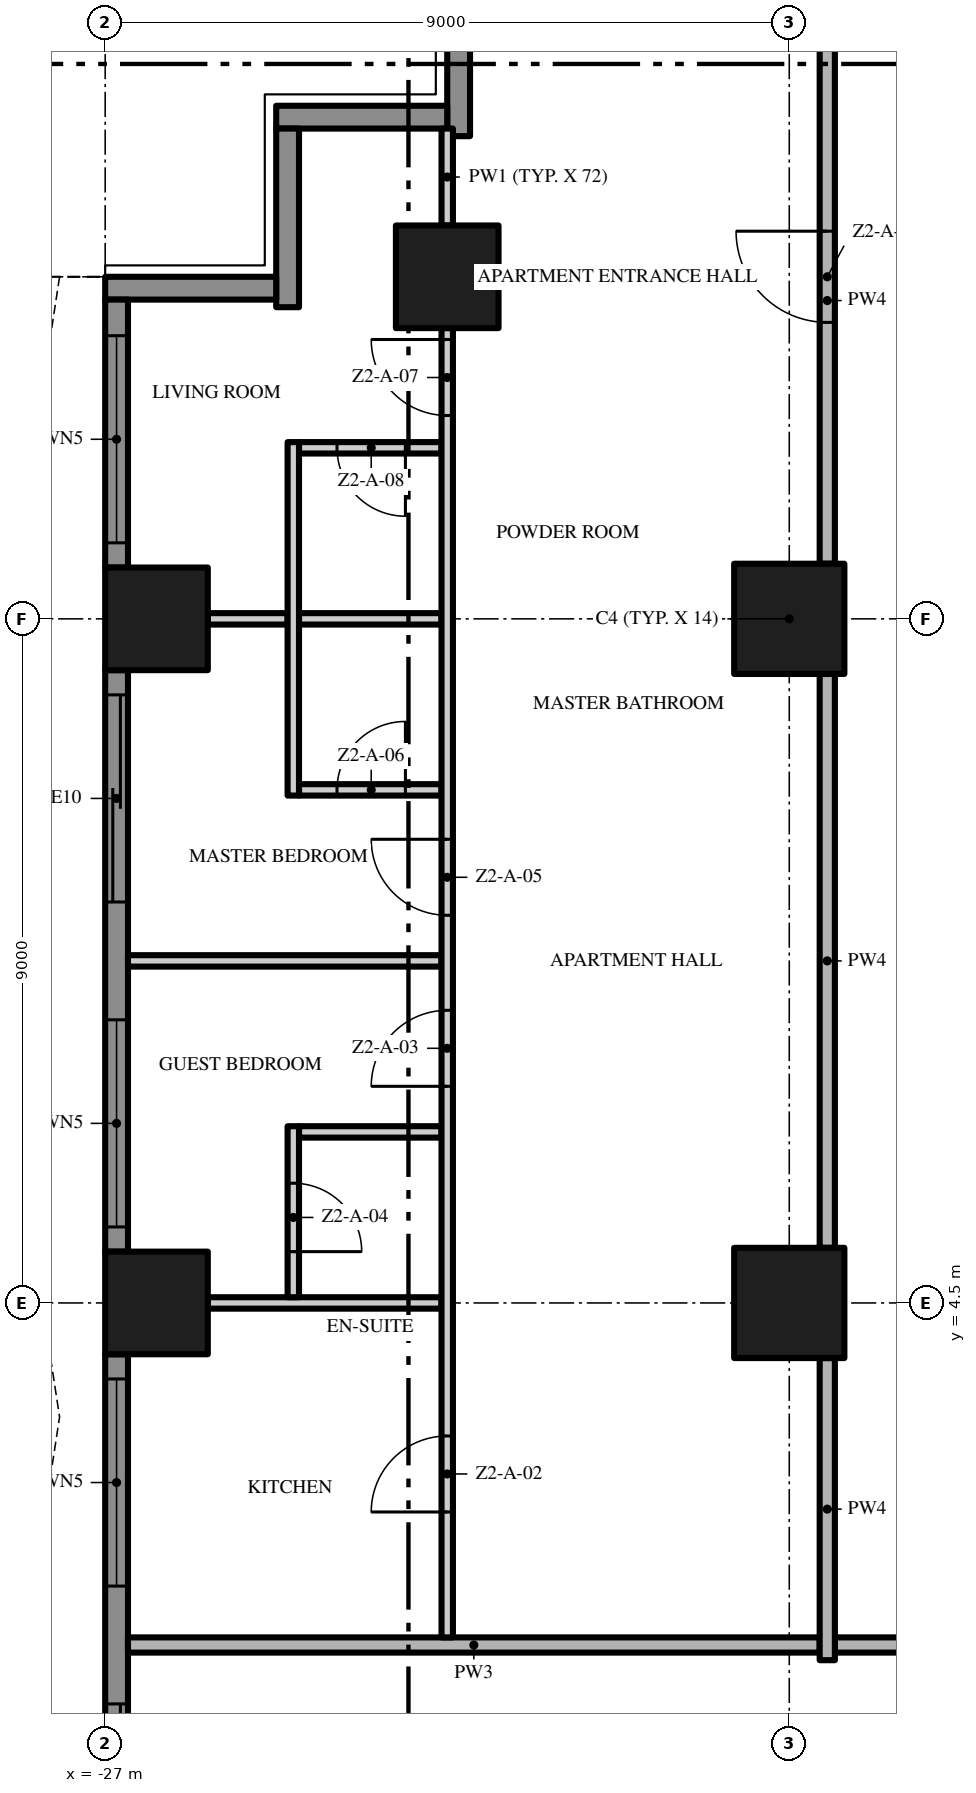
"""IFC4 building model, lengths in metres.
Left out: names, types, materials, properties, quantities, classifications, styles, units other than length and angle.
Written with IfcOpenShell. Run it as: python <this file> out.ifc"""

import sys

from ifc_helpers import new_model, si_unit, direction, frame, frame_2d, origin, origin_2d, place, context, subcontext, project, spatial, polyline, rectangle, outline, extrude, element, fill, save


model = new_model("IFC4")
c1 = context("Model", 3, precision=1e-05, world=origin(), true_north=direction((0.0, 1.0)))
c2 = subcontext(c1, "Body", "Model", "MODEL_VIEW")
j1 = project(units=[si_unit("LENGTHUNIT", "METRE"), si_unit("PLANEANGLEUNIT", "RADIAN")], contexts=[c1])
p1 = place(None, origin())
s1 = spatial("IfcSite", under=j1, at=p1, CompositionType="ELEMENT")
p2 = place(p1, origin())
s2 = spatial("IfcBuilding", under=s1, at=p2, CompositionType="ELEMENT")
p3 = place(p2, frame((0.0, 0.0, 69.4)))
s3 = spatial("IfcBuildingStorey", under=s2, at=p3, CompositionType="ELEMENT", Elevation=69.4)
for number, where, z_axis, x_axis in (
    (1, (-18.0, 13.5, 0.0), (0.0, 0.0, 1.0), (1.0, 0.0, 0.0)),
    (2, (-18.0, 4.5, 0.0), (0.0, 0.0, 1.0), (1.0, 0.0, 0.0)),
):
    element("IfcColumn", number, at=place(p3, frame(where, z_axis=z_axis, x_axis=x_axis)), inside=s3, PredefinedType="COLUMN", context=c2, shape_type="SweptSolid", body=[
        extrude(rectangle(XDim=1.45, YDim=1.45, at=origin_2d()), origin(), (0.0, 0.0, 1.0), 3.5),
    ])
for number, where, z_axis, x_axis in (
    (3, (-26.325, 13.5, 0.0), (0.0, 0.0, 1.0), (1.0, 0.0, 0.0)),
    (4, (-22.5, 18.0, 0.0), (0.0, 0.0, 1.0), (1.0, 0.0, 0.0)),
    (5, (-26.325, 4.5, 0.0), (0.0, 0.0, 1.0), (1.0, 0.0, 0.0)),
):
    element("IfcColumn", number, at=place(p3, frame(where, z_axis=z_axis, x_axis=x_axis)), inside=s3, PredefinedType="COLUMN", context=c2, shape_type="SweptSolid", body=[
        extrude(rectangle(XDim=1.35, YDim=1.35, at=origin_2d()), origin(), (0.0, 0.0, 1.0), 3.5),
    ])
p4 = place(p3, frame((-22.35, 19.85, 0.0), z_axis=(0.0, 0.0, 1.0), x_axis=(0.0, 1.0, 0.0)))
e6 = element("IfcWall", 6, at=p4, inside=s3, PredefinedType="SOLIDWALL", context=c2, shape_type="SweptSolid", body=[
    extrude(rectangle(XDim=2.35, YDim=0.3, at=frame_2d((1.175, 0.0))), origin(), (0.0, 0.0, 1.0), 3.5),
])
p5 = place(p3, frame((-24.75, 20.1, 0.0), z_axis=(0.0, 0.0, 1.0), x_axis=(1.0, 0.0, 0.0)))
e7 = element("IfcWall", 7, at=p5, inside=s3, PredefinedType="SOLIDWALL", context=c2, shape_type="SweptSolid", body=[
    extrude(rectangle(XDim=2.25, YDim=0.3, at=frame_2d((1.125, 0.0))), origin(), (0.0, 0.0, 1.0), 3.5),
])
p6 = place(p3, frame((-24.6, 17.6, 0.0), z_axis=(0.0, 0.0, 1.0), x_axis=(0.0, 1.0, 0.0)))
e8 = element("IfcWall", 8, at=p6, inside=s3, PredefinedType="SOLIDWALL", context=c2, shape_type="SweptSolid", body=[
    extrude(rectangle(XDim=2.35, YDim=0.3, at=frame_2d((1.175, 0.0))), origin(), (0.0, 0.0, 1.0), 3.5),
])
p7 = place(p3, frame((-27.0, 17.85, 0.0), z_axis=(0.0, 0.0, 1.0), x_axis=(1.0, 0.0, 0.0)))
e9 = element("IfcWall", 9, at=p7, inside=s3, PredefinedType="SOLIDWALL", context=c2, shape_type="SweptSolid", body=[
    extrude(rectangle(XDim=2.25, YDim=0.3, at=frame_2d((1.125, 0.0))), origin(), (0.0, 0.0, 1.0), 3.5),
])
p8 = place(p3, frame((-26.85, 14.175, 0.0), z_axis=(0.0, 0.0, 1.0), x_axis=(0.0, 1.0, 0.0)))
e10 = element("IfcWall", 10, at=p8, inside=s3, PredefinedType="SOLIDWALL", context=c2, shape_type="SweptSolid", body=[
    extrude(rectangle(XDim=3.525, YDim=0.3, at=frame_2d((1.762, 0.0))), origin(), (0.0, 0.0, 1.0), 3.5),
])
p9 = place(p8, frame((0.325, 0.0, 0.45)))
e11 = element("IfcOpeningElement", 11, at=p9, cuts=e10, PredefinedType="OPENING", context=c2, shape_type="SweptSolid", body=[
    extrude(rectangle(XDim=2.725, YDim=2.65, at=frame_2d((1.363, 1.325))), frame((0.0, 0.16, 0.0), z_axis=(0.0, -1.0, 0.0), x_axis=(1.0, 0.0, 0.0)), (0.0, 0.0, 1.0), 0.32),
])
p10 = place(p3, frame((-26.85, 5.175, 0.0), z_axis=(0.0, 0.0, 1.0), x_axis=(0.0, 1.0, 0.0)))
e12 = element("IfcWall", 12, at=p10, inside=s3, PredefinedType="SOLIDWALL", context=c2, shape_type="SweptSolid", body=[
    extrude(rectangle(XDim=7.65, YDim=0.3, at=frame_2d((3.825, 0.0))), origin(), (0.0, 0.0, 1.0), 3.5),
])
p11 = place(p10, frame((4.6, 0.0, 0.0)))
e13 = element("IfcOpeningElement", 13, at=p11, cuts=e12, PredefinedType="OPENING", context=c2, shape_type="SweptSolid", body=[
    extrude(rectangle(XDim=2.725, YDim=2.4, at=frame_2d((1.363, 1.2))), frame((0.0, 0.16, 0.0), z_axis=(0.0, -1.0, 0.0), x_axis=(1.0, 0.0, 0.0)), (0.0, 0.0, 1.0), 0.32),
])
p12 = place(p10, frame((0.325, 0.0, 0.45)))
e14 = element("IfcOpeningElement", 14, at=p12, cuts=e12, PredefinedType="OPENING", context=c2, shape_type="SweptSolid", body=[
    extrude(rectangle(XDim=2.725, YDim=2.65, at=frame_2d((1.363, 1.325))), frame((0.0, 0.16, 0.0), z_axis=(0.0, -1.0, 0.0), x_axis=(1.0, 0.0, 0.0)), (0.0, 0.0, 1.0), 0.32),
])
p13 = place(p3, frame((-26.85, -3.825, 0.0), z_axis=(0.0, 0.0, 1.0), x_axis=(0.0, 1.0, 0.0)))
e15 = element("IfcWall", 15, at=p13, inside=s3, PredefinedType="SOLIDWALL", context=c2, shape_type="SweptSolid", body=[
    extrude(rectangle(XDim=7.65, YDim=0.3, at=frame_2d((3.825, 0.0))), origin(), (0.0, 0.0, 1.0), 3.5),
])
p14 = place(p13, frame((4.6, 0.0, 0.45)))
e16 = element("IfcOpeningElement", 16, at=p14, cuts=e15, PredefinedType="OPENING", context=c2, shape_type="SweptSolid", body=[
    extrude(rectangle(XDim=2.725, YDim=2.65, at=frame_2d((1.363, 1.325))), frame((0.0, 0.16, 0.0), z_axis=(0.0, -1.0, 0.0), x_axis=(1.0, 0.0, 0.0)), (0.0, 0.0, 1.0), 0.32),
])
p15 = place(p13, frame((0.325, 0.0, 0.0)))
e17 = element("IfcOpeningElement", 17, at=p15, cuts=e15, PredefinedType="OPENING", context=c2, shape_type="SweptSolid", body=[
    extrude(rectangle(XDim=2.725, YDim=2.4, at=frame_2d((1.363, 1.2))), frame((0.0, 0.16, 0.0), z_axis=(0.0, -1.0, 0.0), x_axis=(1.0, 0.0, 0.0)), (0.0, 0.0, 1.0), 0.32),
])
p16 = place(p3, origin())
e18 = element("IfcWall", 18, at=p16, inside=s3, PredefinedType="USERDEFINED", context=c2, shape_type="SweptSolid", body=[
    extrude(outline(polyline([(-27.6, 18.0), (-27.829, 16.5), (-28.429, 15.0), (-29.171, 13.5), (-29.771, 12.0), (-30.0, 10.5), (-29.771, 9.0), (-29.171, 7.5), (-28.429, 6.0), (-27.829, 4.5), (-27.6, 3.0), (-27.829, 1.5), (-28.429, 0.0), (-29.171, -1.5), (-29.771, -3.0), (-30.0, -4.5), (-29.771, -6.0), (-29.171, -7.5), (-28.429, -9.0), (-27.829, -10.5), (-27.6, -12.0), (-27.829, -13.5), (-28.429, -15.0), (-29.171, -16.5), (-29.771, -18.0), (-29.539, -18.093), (-28.942, -16.602), (-28.201, -15.102), (-27.586, -13.566), (-27.347, -12.0), (-27.586, -10.434), (-28.201, -8.898), (-28.942, -7.398), (-29.528, -5.934), (-29.747, -4.5), (-29.528, -3.066), (-28.942, -1.602), (-28.201, -0.102), (-27.586, 1.434), (-27.347, 3.0), (-27.586, 4.566), (-28.201, 6.102), (-28.942, 7.602), (-29.528, 9.066), (-29.747, 10.5), (-29.528, 11.934), (-28.942, 13.398), (-28.201, 14.898), (-27.586, 16.434), (-27.353, 17.962), (-27.6, 18.0)])), origin(), (0.0, 0.0, 1.0), 0.9),
])
p17 = place(p3, frame((-0.1, 0.0, 0.0), z_axis=(0.0, 0.0, 1.0), x_axis=(-1.0, 0.0, 0.0)))
e19 = element("IfcWall", 19, at=p17, inside=s3, PredefinedType="PARTITIONING", context=c2, shape_type="SweptSolid", body=[
    extrude(rectangle(XDim=17.3, YDim=0.2, at=frame_2d((8.65, 0.0))), origin(), (0.0, 0.0, 1.0), 3.5),
])
p18 = place(p17, frame((8.15, 0.0, 0.0)))
e20 = element("IfcOpeningElement", 20, at=p18, cuts=e19, PredefinedType="OPENING", context=c2, shape_type="SweptSolid", body=[
    extrude(rectangle(XDim=1.5, YDim=2.4, at=frame_2d((0.75, 1.2))), frame((0.0, 0.11, 0.0), z_axis=(0.0, -1.0, 0.0), x_axis=(1.0, 0.0, 0.0)), (0.0, 0.0, 1.0), 0.22),
])
p19 = place(p3, frame((-26.7, 0.0, 0.0), z_axis=(0.0, 0.0, 1.0), x_axis=(1.0, 0.0, 0.0)))
e21 = element("IfcWall", 21, at=p19, inside=s3, PredefinedType="PARTITIONING", context=c2, shape_type="SweptSolid", body=[
    extrude(rectangle(XDim=9.1, YDim=0.2, at=frame_2d((4.55, 0.0))), origin(), (0.0, 0.0, 1.0), 3.5),
])
p20 = place(p3, frame((-25.65, 4.5, 0.0), z_axis=(0.0, 0.0, 1.0), x_axis=(1.0, 0.0, 0.0)))
e22 = element("IfcWall", 22, at=p20, inside=s3, PredefinedType="PARTITIONING", context=c2, shape_type="SweptSolid", body=[
    extrude(rectangle(XDim=3.075, YDim=0.15, at=frame_2d((1.538, 0.0))), origin(), (0.0, 0.0, 1.0), 3.5),
])
p21 = place(p3, frame((-24.45, 6.75, 0.0), z_axis=(0.0, 0.0, 1.0), x_axis=(1.0, 0.0, 0.0)))
e23 = element("IfcWall", 23, at=p21, inside=s3, PredefinedType="PARTITIONING", context=c2, shape_type="SweptSolid", body=[
    extrude(rectangle(XDim=1.875, YDim=0.15, at=frame_2d((0.938, 0.0))), origin(), (0.0, 0.0, 1.0), 3.5),
])
p22 = place(p3, frame((-26.7, 9.0, 0.0), z_axis=(0.0, 0.0, 1.0), x_axis=(1.0, 0.0, 0.0)))
e24 = element("IfcWall", 24, at=p22, inside=s3, PredefinedType="PARTITIONING", context=c2, shape_type="SweptSolid", body=[
    extrude(rectangle(XDim=4.125, YDim=0.15, at=frame_2d((2.062, 0.0))), origin(), (0.0, 0.0, 1.0), 3.5),
])
p23 = place(p3, frame((-24.45, 11.25, 0.0), z_axis=(0.0, 0.0, 1.0), x_axis=(1.0, 0.0, 0.0)))
e25 = element("IfcWall", 25, at=p23, inside=s3, PredefinedType="PARTITIONING", context=c2, shape_type="SweptSolid", body=[
    extrude(rectangle(XDim=1.875, YDim=0.15, at=frame_2d((0.938, 0.0))), origin(), (0.0, 0.0, 1.0), 3.5),
])
p24 = place(p23, frame((0.5, 0.0, 0.0)))
e26 = element("IfcOpeningElement", 26, at=p24, cuts=e25, PredefinedType="OPENING", context=c2, shape_type="SweptSolid", body=[
    extrude(rectangle(XDim=0.9, YDim=2.1, at=frame_2d((0.45, 1.05))), frame((0.0, 0.085, 0.0), z_axis=(0.0, -1.0, 0.0), x_axis=(1.0, 0.0, 0.0)), (0.0, 0.0, 1.0), 0.17),
])
p25 = place(p3, frame((-25.65, 13.5, 0.0), z_axis=(0.0, 0.0, 1.0), x_axis=(1.0, 0.0, 0.0)))
e27 = element("IfcWall", 27, at=p25, inside=s3, PredefinedType="PARTITIONING", context=c2, shape_type="SweptSolid", body=[
    extrude(rectangle(XDim=1.05, YDim=0.15, at=frame_2d((0.525, 0.0))), origin(), (0.0, 0.0, 1.0), 3.5),
])
p26 = place(p3, frame((-24.45, 13.5, 0.0), z_axis=(0.0, 0.0, 1.0), x_axis=(1.0, 0.0, 0.0)))
e28 = element("IfcWall", 28, at=p26, inside=s3, PredefinedType="PARTITIONING", context=c2, shape_type="SweptSolid", body=[
    extrude(rectangle(XDim=1.875, YDim=0.15, at=frame_2d((0.938, 0.0))), origin(), (0.0, 0.0, 1.0), 3.5),
])
p27 = place(p3, frame((-22.575, 15.75, 0.0), z_axis=(0.0, 0.0, 1.0), x_axis=(-1.0, 0.0, 0.0)))
e29 = element("IfcWall", 29, at=p27, inside=s3, PredefinedType="PARTITIONING", context=c2, shape_type="SweptSolid", body=[
    extrude(rectangle(XDim=1.875, YDim=0.15, at=frame_2d((0.938, 0.0))), origin(), (0.0, 0.0, 1.0), 3.5),
])
p28 = place(p27, frame((0.475, 0.0, 0.0)))
e30 = element("IfcOpeningElement", 30, at=p28, cuts=e29, PredefinedType="OPENING", context=c2, shape_type="SweptSolid", body=[
    extrude(rectangle(XDim=0.9, YDim=2.1, at=frame_2d((0.45, 1.05))), frame((0.0, 0.085, 0.0), z_axis=(0.0, -1.0, 0.0), x_axis=(1.0, 0.0, 0.0)), (0.0, 0.0, 1.0), 0.17),
])
p29 = place(p3, frame((-24.525, 6.825, 0.0), z_axis=(0.0, 0.0, 1.0), x_axis=(0.0, -1.0, 0.0)))
e31 = element("IfcWall", 31, at=p29, inside=s3, PredefinedType="PARTITIONING", context=c2, shape_type="SweptSolid", body=[
    extrude(rectangle(XDim=2.25, YDim=0.15, at=frame_2d((1.125, 0.0))), origin(), (0.0, 0.0, 1.0), 3.5),
])
p30 = place(p29, frame((0.75, 0.0, 0.0)))
e32 = element("IfcOpeningElement", 32, at=p30, cuts=e31, PredefinedType="OPENING", context=c2, shape_type="SweptSolid", body=[
    extrude(rectangle(XDim=0.9, YDim=2.1, at=frame_2d((0.45, 1.05))), frame((0.0, 0.085, 0.0), z_axis=(0.0, -1.0, 0.0), x_axis=(1.0, 0.0, 0.0)), (0.0, 0.0, 1.0), 0.17),
])
p31 = place(p3, frame((-24.525, 11.175, 0.0), z_axis=(0.0, 0.0, 1.0), x_axis=(0.0, 1.0, 0.0)))
e33 = element("IfcWall", 33, at=p31, inside=s3, PredefinedType="PARTITIONING", context=c2, shape_type="SweptSolid", body=[
    extrude(rectangle(XDim=4.65, YDim=0.15, at=frame_2d((2.325, 0.0))), origin(), (0.0, 0.0, 1.0), 3.5),
])
p32 = place(p3, frame((-22.5, 0.1, 0.0), z_axis=(0.0, 0.0, 1.0), x_axis=(0.0, 1.0, 0.0)))
e34 = element("IfcWall", 34, at=p32, inside=s3, PredefinedType="PARTITIONING", context=c2, shape_type="SweptSolid", body=[
    extrude(rectangle(XDim=17.225, YDim=0.15, at=frame_2d((8.613, 0.0))), origin(), (0.0, 0.0, 1.0), 3.5),
])
p33 = place(p32, frame((1.65, 0.0, 0.0)))
e35 = element("IfcOpeningElement", 35, at=p33, cuts=e34, PredefinedType="OPENING", context=c2, shape_type="SweptSolid", body=[
    extrude(rectangle(XDim=1.0, YDim=2.4, at=frame_2d((0.5, 1.2))), frame((0.0, 0.085, 0.0), z_axis=(0.0, -1.0, 0.0), x_axis=(1.0, 0.0, 0.0)), (0.0, 0.0, 1.0), 0.17),
])
p34 = place(p32, frame((7.25, 0.0, 0.0)))
e36 = element("IfcOpeningElement", 36, at=p34, cuts=e34, PredefinedType="OPENING", context=c2, shape_type="SweptSolid", body=[
    extrude(rectangle(XDim=1.0, YDim=2.4, at=frame_2d((0.5, 1.2))), frame((0.0, 0.085, 0.0), z_axis=(0.0, -1.0, 0.0), x_axis=(1.0, 0.0, 0.0)), (0.0, 0.0, 1.0), 0.17),
])
p35 = place(p32, frame((9.5, 0.0, 0.0)))
e37 = element("IfcOpeningElement", 37, at=p35, cuts=e34, PredefinedType="OPENING", context=c2, shape_type="SweptSolid", body=[
    extrude(rectangle(XDim=1.0, YDim=2.4, at=frame_2d((0.5, 1.2))), frame((0.0, 0.085, 0.0), z_axis=(0.0, -1.0, 0.0), x_axis=(1.0, 0.0, 0.0)), (0.0, 0.0, 1.0), 0.17),
])
p36 = place(p32, frame((16.075, 0.0, 0.0)))
e38 = element("IfcOpeningElement", 38, at=p36, cuts=e34, PredefinedType="OPENING", context=c2, shape_type="SweptSolid", body=[
    extrude(rectangle(XDim=1.0, YDim=2.4, at=frame_2d((0.5, 1.2))), frame((0.0, 0.085, 0.0), z_axis=(0.0, -1.0, 0.0), x_axis=(1.0, 0.0, 0.0)), (0.0, 0.0, 1.0), 0.17),
])
p37 = place(p3, frame((-22.5, 18.675, 0.0), z_axis=(0.0, 0.0, 1.0), x_axis=(0.0, 1.0, 0.0)))
e39 = element("IfcWall", 39, at=p37, inside=s3, PredefinedType="PARTITIONING", context=c2, shape_type="SweptSolid", body=[
    extrude(rectangle(XDim=1.275, YDim=0.15, at=frame_2d((0.637, 0.0))), origin(), (0.0, 0.0, 1.0), 3.5),
])
p38 = place(p3, frame((-17.5, -0.2, 0.0), z_axis=(0.0, 0.0, 1.0), x_axis=(0.0, 1.0, 0.0)))
e40 = element("IfcWall", 40, at=p38, inside=s3, PredefinedType="PARTITIONING", context=c2, shape_type="SweptSolid", body=[
    extrude(rectangle(XDim=3.975, YDim=0.2, at=frame_2d((1.988, 0.0))), origin(), (0.0, 0.0, 1.0), 3.5),
])
p39 = place(p3, frame((-17.5, 5.225, 0.0), z_axis=(0.0, 0.0, 1.0), x_axis=(0.0, 1.0, 0.0)))
e41 = element("IfcWall", 41, at=p39, inside=s3, PredefinedType="PARTITIONING", context=c2, shape_type="SweptSolid", body=[
    extrude(rectangle(XDim=7.55, YDim=0.2, at=frame_2d((3.775, 0.0))), origin(), (0.0, 0.0, 1.0), 3.5),
])
p40 = place(p3, frame((-17.5, 14.225, 0.0), z_axis=(0.0, 0.0, 1.0), x_axis=(0.0, 1.0, 0.0)))
e42 = element("IfcWall", 42, at=p40, inside=s3, PredefinedType="PARTITIONING", context=c2, shape_type="SweptSolid", body=[
    extrude(rectangle(XDim=6.925, YDim=0.2, at=frame_2d((3.462, 0.0))), origin(), (0.0, 0.0, 1.0), 3.5),
])
p41 = place(p40, frame((3.175, 0.0, 0.0)))
e43 = element("IfcOpeningElement", 43, at=p41, cuts=e42, PredefinedType="OPENING", context=c2, shape_type="SweptSolid", body=[
    extrude(rectangle(XDim=1.2, YDim=2.4, at=frame_2d((0.6, 1.2))), frame((0.0, 0.11, 0.0), z_axis=(0.0, -1.0, 0.0), x_axis=(1.0, 0.0, 0.0)), (0.0, 0.0, 1.0), 0.22),
])
p42 = place(p9, origin())
e44 = element("IfcWindow", 44, at=p42, inside=s3, PartitioningType="SINGLE_PANEL", PredefinedType="WINDOW", context=c2, shape_type="SweptSolid", body=[
    extrude(rectangle(XDim=2.725, YDim=2.65, at=frame_2d((1.363, 1.325))), frame((0.0, 0.03, 0.0), z_axis=(0.0, -1.0, 0.0), x_axis=(1.0, 0.0, 0.0)), (0.0, 0.0, 1.0), 0.06),
])
fill(e11, e44)
p43 = place(p11, origin())
e45 = element("IfcDoor", 45, at=p43, inside=s3, OperationType="SINGLE_SWING_LEFT", PredefinedType="DOOR", context=c2, shape_type="SweptSolid", body=[
    extrude(rectangle(XDim=2.725, YDim=2.4, at=frame_2d((1.363, 1.2))), frame((0.0, 0.025, 0.0), z_axis=(0.0, -1.0, 0.0), x_axis=(1.0, 0.0, 0.0)), (0.0, 0.0, 1.0), 0.05),
])
fill(e13, e45)
p44 = place(p12, origin())
e46 = element("IfcWindow", 46, at=p44, inside=s3, PartitioningType="SINGLE_PANEL", PredefinedType="WINDOW", context=c2, shape_type="SweptSolid", body=[
    extrude(rectangle(XDim=2.725, YDim=2.65, at=frame_2d((1.363, 1.325))), frame((0.0, 0.03, 0.0), z_axis=(0.0, -1.0, 0.0), x_axis=(1.0, 0.0, 0.0)), (0.0, 0.0, 1.0), 0.06),
])
fill(e14, e46)
p45 = place(p14, origin())
e47 = element("IfcWindow", 47, at=p45, inside=s3, PartitioningType="SINGLE_PANEL", PredefinedType="WINDOW", context=c2, shape_type="SweptSolid", body=[
    extrude(rectangle(XDim=2.725, YDim=2.65, at=frame_2d((1.363, 1.325))), frame((0.0, 0.03, 0.0), z_axis=(0.0, -1.0, 0.0), x_axis=(1.0, 0.0, 0.0)), (0.0, 0.0, 1.0), 0.06),
])
fill(e16, e47)
p46 = place(p15, origin())
e48 = element("IfcDoor", 48, at=p46, inside=s3, OperationType="SINGLE_SWING_LEFT", PredefinedType="DOOR", context=c2, shape_type="SweptSolid", body=[
    extrude(rectangle(XDim=2.725, YDim=2.4, at=frame_2d((1.363, 1.2))), frame((0.0, 0.025, 0.0), z_axis=(0.0, -1.0, 0.0), x_axis=(1.0, 0.0, 0.0)), (0.0, 0.0, 1.0), 0.05),
])
fill(e17, e48)
p47 = place(p41, origin())
e49 = element("IfcDoor", 49, at=p47, inside=s3, OperationType="SINGLE_SWING_RIGHT", PredefinedType="DOOR", context=c2, shape_type="SweptSolid", body=[
    extrude(rectangle(XDim=1.2, YDim=2.4, at=frame_2d((0.6, 1.2))), frame((0.0, 0.025, 0.0), z_axis=(0.0, -1.0, 0.0), x_axis=(1.0, 0.0, 0.0)), (0.0, 0.0, 1.0), 0.05),
])
fill(e43, e49)
p48 = place(p33, origin())
e50 = element("IfcDoor", 50, at=p48, inside=s3, OperationType="SINGLE_SWING_LEFT", PredefinedType="DOOR", context=c2, shape_type="SweptSolid", body=[
    extrude(rectangle(XDim=1.0, YDim=2.4, at=frame_2d((0.5, 1.2))), frame((0.0, 0.025, 0.0), z_axis=(0.0, -1.0, 0.0), x_axis=(1.0, 0.0, 0.0)), (0.0, 0.0, 1.0), 0.05),
])
fill(e35, e50)
p49 = place(p34, origin())
e51 = element("IfcDoor", 51, at=p49, inside=s3, OperationType="SINGLE_SWING_LEFT", PredefinedType="DOOR", context=c2, shape_type="SweptSolid", body=[
    extrude(rectangle(XDim=1.0, YDim=2.4, at=frame_2d((0.5, 1.2))), frame((0.0, 0.025, 0.0), z_axis=(0.0, -1.0, 0.0), x_axis=(1.0, 0.0, 0.0)), (0.0, 0.0, 1.0), 0.05),
])
fill(e36, e51)
p50 = place(p30, origin())
e52 = element("IfcDoor", 52, at=p50, inside=s3, OperationType="SINGLE_SWING_RIGHT", PredefinedType="DOOR", context=c2, shape_type="SweptSolid", body=[
    extrude(rectangle(XDim=0.9, YDim=2.1, at=frame_2d((0.45, 1.05))), frame((0.0, 0.025, 0.0), z_axis=(0.0, -1.0, 0.0), x_axis=(1.0, 0.0, 0.0)), (0.0, 0.0, 1.0), 0.05),
])
fill(e32, e52)
p51 = place(p35, origin())
e53 = element("IfcDoor", 53, at=p51, inside=s3, OperationType="SINGLE_SWING_RIGHT", PredefinedType="DOOR", context=c2, shape_type="SweptSolid", body=[
    extrude(rectangle(XDim=1.0, YDim=2.4, at=frame_2d((0.5, 1.2))), frame((0.0, 0.025, 0.0), z_axis=(0.0, -1.0, 0.0), x_axis=(1.0, 0.0, 0.0)), (0.0, 0.0, 1.0), 0.05),
])
fill(e37, e53)
p52 = place(p24, origin())
e54 = element("IfcDoor", 54, at=p52, inside=s3, OperationType="SINGLE_SWING_RIGHT", PredefinedType="DOOR", context=c2, shape_type="SweptSolid", body=[
    extrude(rectangle(XDim=0.9, YDim=2.1, at=frame_2d((0.45, 1.05))), frame((0.0, 0.025, 0.0), z_axis=(0.0, -1.0, 0.0), x_axis=(1.0, 0.0, 0.0)), (0.0, 0.0, 1.0), 0.05),
])
fill(e26, e54)
p53 = place(p36, origin())
e55 = element("IfcDoor", 55, at=p53, inside=s3, OperationType="SINGLE_SWING_RIGHT", PredefinedType="DOOR", context=c2, shape_type="SweptSolid", body=[
    extrude(rectangle(XDim=1.0, YDim=2.4, at=frame_2d((0.5, 1.2))), frame((0.0, 0.025, 0.0), z_axis=(0.0, -1.0, 0.0), x_axis=(1.0, 0.0, 0.0)), (0.0, 0.0, 1.0), 0.05),
])
fill(e38, e55)
p54 = place(p28, origin())
e56 = element("IfcDoor", 56, at=p54, inside=s3, OperationType="SINGLE_SWING_LEFT", PredefinedType="DOOR", context=c2, shape_type="SweptSolid", body=[
    extrude(rectangle(XDim=0.9, YDim=2.1, at=frame_2d((0.45, 1.05))), frame((0.0, 0.025, 0.0), z_axis=(0.0, -1.0, 0.0), x_axis=(1.0, 0.0, 0.0)), (0.0, 0.0, 1.0), 0.05),
])
fill(e30, e56)
save(model, sys.argv[1])
